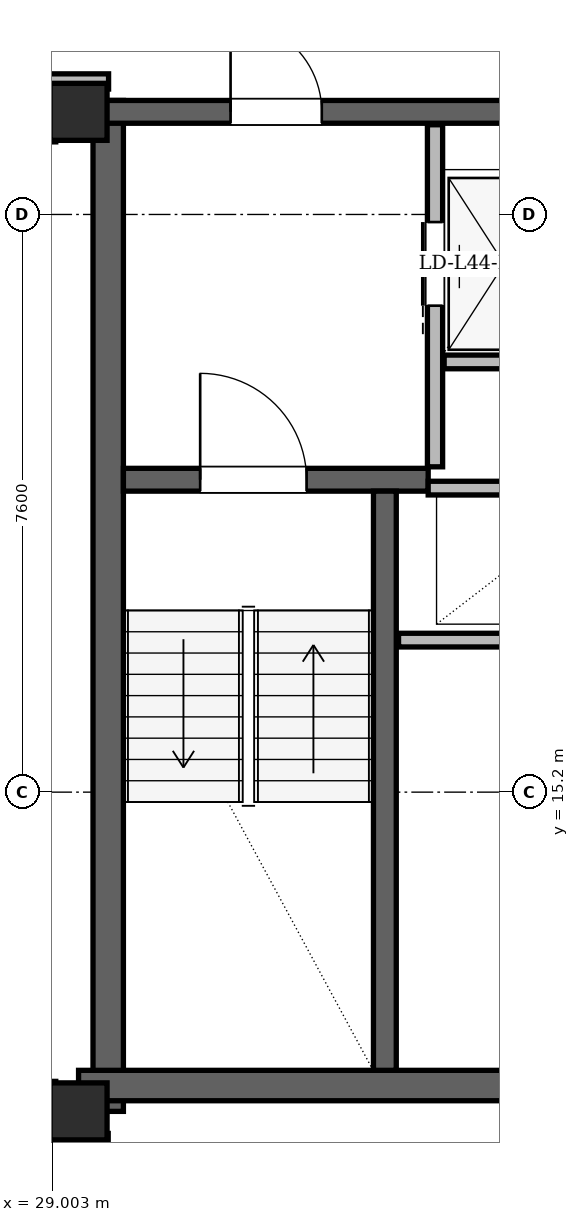
"""IFC4 building model, lengths in metres.
Left out: names, types, materials, properties, quantities, classifications, styles, units other than length and angle.
Written with IfcOpenShell. Run it as: python <this file> out.ifc"""

import sys

from ifc_helpers import new_model, si_unit, direction, frame, frame_2d, origin, origin_2d, place, context, subcontext, project, spatial, rectangle, hollow_rectangle, extrude, element, fill, save


model = new_model("IFC4")
c1 = context("Model", 3, precision=1e-05, world=origin(), true_north=direction((0.0, 1.0)))
c2 = subcontext(c1, "Body", "Model", "MODEL_VIEW")
j1 = project(units=[si_unit("LENGTHUNIT", "METRE"), si_unit("PLANEANGLEUNIT", "RADIAN")], contexts=[c1])
p1 = place(None, origin())
s1 = spatial("IfcSite", under=j1, at=p1, CompositionType="ELEMENT")
p2 = place(p1, origin())
s2 = spatial("IfcBuilding", under=s1, at=p2, CompositionType="ELEMENT")
p3 = place(p2, frame((0.0, 0.0, 167.4)))
s3 = spatial("IfcBuildingStorey", under=s2, at=p3, CompositionType="ELEMENT", Elevation=167.4)
for number, where, z_axis, x_axis in (
    (1, (29.35, 11.0, 0.0), (0.0, 0.0, 1.0), (1.0, 0.0, 0.0)),
    (2, (29.35, 24.15, 0.0), (0.0, 0.0, 1.0), (1.0, 0.0, 0.0)),
):
    element("IfcColumn", number, at=place(p3, frame(where, z_axis=z_axis, x_axis=x_axis)), inside=s3, PredefinedType="COLUMN", context=c2, shape_type="SweptSolid", body=[
        extrude(hollow_rectangle(XDim=0.75, YDim=0.75, WallThickness=0.06, at=origin_2d()), origin(), (0.0, 0.0, 1.0), 3.6),
    ])
p4 = place(p3, frame((29.74, 11.0, 0.0), z_axis=(0.0, 0.0, 1.0), x_axis=(0.0, 1.0, 0.0)))
e3 = element("IfcWall", 3, at=p4, inside=s3, PredefinedType="SHEAR", context=c2, shape_type="SweptSolid", body=[
    extrude(rectangle(XDim=13.3, YDim=0.4, at=frame_2d((6.65, 0.0))), origin(), (0.0, 0.0, 1.0), 3.38),
])
p5 = place(p3, frame((29.35, 11.34, 0.0), z_axis=(0.0, 0.0, 1.0), x_axis=(1.0, 0.0, 0.0)))
e4 = element("IfcWall", 4, at=p5, inside=s3, PredefinedType="SHEAR", context=c2, shape_type="SweptSolid", body=[
    extrude(rectangle(XDim=7.1, YDim=0.4, at=frame_2d((3.55, 0.0))), origin(), (0.0, 0.0, 1.0), 3.38),
])
p6 = place(p3, frame((29.65, 24.15, 0.0), z_axis=(0.0, 0.0, 1.0), x_axis=(1.0, 0.0, 0.0)))
e5 = element("IfcWall", 5, at=p6, inside=s3, PredefinedType="SHEAR", context=c2, shape_type="SweptSolid", body=[
    extrude(rectangle(XDim=15.7, YDim=0.3, at=frame_2d((7.85, 0.0))), origin(), (0.0, 0.0, 1.0), 3.38),
])
p7 = place(p6, frame((1.7, 0.0, 0.0)))
e6 = element("IfcOpeningElement", 6, at=p7, cuts=e5, PredefinedType="OPENING", context=c2, shape_type="SweptSolid", body=[
    extrude(rectangle(XDim=1.2, YDim=2.2, at=frame_2d((0.6, 1.1))), frame((0.0, 0.15, 0.0), z_axis=(0.0, -1.0, 0.0), x_axis=(1.0, 0.0, 0.0)), (0.0, 0.0, 1.0), 0.3),
])
p8 = place(p6, frame((12.8, 0.0, 0.0)))
e7 = element("IfcOpeningElement", 7, at=p8, cuts=e5, PredefinedType="OPENING", context=c2, shape_type="SweptSolid", body=[
    extrude(rectangle(XDim=1.2, YDim=2.2, at=frame_2d((0.6, 1.1))), frame((0.0, 0.15, 0.0), z_axis=(0.0, -1.0, 0.0), x_axis=(1.0, 0.0, 0.0)), (0.0, 0.0, 1.0), 0.3),
])
p9 = place(p6, frame((6.55, 0.0, 0.0)))
e8 = element("IfcOpeningElement", 8, at=p9, cuts=e5, PredefinedType="OPENING", context=c2, shape_type="SweptSolid", body=[
    extrude(rectangle(XDim=0.9, YDim=2.05, at=frame_2d((0.45, 1.025))), frame((0.0, 0.15, 0.0), z_axis=(0.0, -1.0, 0.0), x_axis=(1.0, 0.0, 0.0)), (0.0, 0.0, 1.0), 0.3),
])
p10 = place(p6, frame((8.45, 0.0, 0.0)))
e9 = element("IfcOpeningElement", 9, at=p10, cuts=e5, PredefinedType="OPENING", context=c2, shape_type="SweptSolid", body=[
    extrude(rectangle(XDim=0.9, YDim=2.05, at=frame_2d((0.45, 1.025))), frame((0.0, 0.15, 0.0), z_axis=(0.0, -1.0, 0.0), x_axis=(1.0, 0.0, 0.0)), (0.0, 0.0, 1.0), 0.3),
])
p11 = place(p3, frame((29.94, 19.31, 0.0), z_axis=(0.0, 0.0, 1.0), x_axis=(1.0, 0.0, 0.0)))
e10 = element("IfcWall", 10, at=p11, inside=s3, PredefinedType="SHEAR", context=c2, shape_type="SweptSolid", body=[
    extrude(rectangle(XDim=4.01, YDim=0.3, at=frame_2d((2.005, 0.0))), origin(), (0.0, 0.0, 1.0), 3.38),
])
p12 = place(p11, frame((1.01, 0.0, 0.0)))
e11 = element("IfcOpeningElement", 11, at=p12, cuts=e10, PredefinedType="OPENING", context=c2, shape_type="SweptSolid", body=[
    extrude(rectangle(XDim=1.4, YDim=2.2, at=frame_2d((0.7, 1.1))), frame((0.0, 0.15, 0.0), z_axis=(0.0, -1.0, 0.0), x_axis=(1.0, 0.0, 0.0)), (0.0, 0.0, 1.0), 0.3),
])
p13 = place(p3, frame((33.38, 11.54, 0.0), z_axis=(0.0, 0.0, 1.0), x_axis=(0.0, 1.0, 0.0)))
e12 = element("IfcWall", 12, at=p13, inside=s3, PredefinedType="SHEAR", context=c2, shape_type="SweptSolid", body=[
    extrude(rectangle(XDim=7.62, YDim=0.3, at=frame_2d((3.81, 0.0))), origin(), (0.0, 0.0, 1.0), 3.38),
])
p14 = place(p3, frame((33.146, 43.285, 0.0), z_axis=(0.0, 0.0, 1.0), x_axis=(-0.499997523705, -0.86602683347, 0.0)))
e13 = element("IfcWall", 13, at=p14, inside=s3, PredefinedType="SOLIDWALL", context=c2, shape_type="SweptSolid", body=[
    extrude(rectangle(XDim=35.802, YDim=0.29, at=frame_2d((17.901, 0.0))), origin(), (0.0, 0.0, 1.0), 2.6),
])
p15 = place(p14, frame((6.76, 0.0, 0.0)))
e14 = element("IfcOpeningElement", 14, at=p15, cuts=e13, PredefinedType="OPENING", context=c2, shape_type="SweptSolid", body=[
    extrude(rectangle(XDim=1.0, YDim=2.18, at=frame_2d((0.5, 1.09))), frame((0.0, 0.145, 0.0), z_axis=(0.0, -1.0, 0.0), x_axis=(1.0, 0.0, 0.0)), (0.0, 0.0, 1.0), 0.29),
])
p16 = place(p14, frame((26.688, 0.0, 0.0)))
e15 = element("IfcOpeningElement", 15, at=p16, cuts=e13, PredefinedType="OPENING", context=c2, shape_type="SweptSolid", body=[
    extrude(rectangle(XDim=1.5, YDim=2.2, at=frame_2d((0.75, 1.1))), frame((0.0, 0.145, 0.0), z_axis=(0.0, -1.0, 0.0), x_axis=(1.0, 0.0, 0.0)), (0.0, 0.0, 1.0), 0.29),
])
p17 = place(p14, frame((33.698, 0.0, 0.85)))
e16 = element("IfcOpeningElement", 16, at=p17, cuts=e13, PredefinedType="OPENING", context=c2, shape_type="SweptSolid", body=[
    extrude(rectangle(XDim=1.2, YDim=1.48, at=frame_2d((0.6, 0.74))), frame((0.0, 0.145, 0.0), z_axis=(0.0, -1.0, 0.0), x_axis=(1.0, 0.0, 0.0)), (0.0, 0.0, 1.0), 0.29),
])
p18 = place(p14, frame((22.123, 0.0, 0.85)))
e17 = element("IfcOpeningElement", 17, at=p18, cuts=e13, PredefinedType="OPENING", context=c2, shape_type="SweptSolid", body=[
    extrude(rectangle(XDim=1.2, YDim=1.48, at=frame_2d((0.6, 0.74))), frame((0.0, 0.145, 0.0), z_axis=(0.0, -1.0, 0.0), x_axis=(1.0, 0.0, 0.0)), (0.0, 0.0, 1.0), 0.29),
])
p19 = place(p14, frame((12.284, 0.0, 0.85)))
e18 = element("IfcOpeningElement", 18, at=p19, cuts=e13, PredefinedType="OPENING", context=c2, shape_type="SweptSolid", body=[
    extrude(rectangle(XDim=1.6, YDim=1.64, at=frame_2d((0.8, 0.82))), frame((0.0, 0.145, 0.0), z_axis=(0.0, -1.0, 0.0), x_axis=(1.0, 0.0, 0.0)), (0.0, 0.0, 1.0), 0.29),
])
p20 = place(p14, frame((17.539, 0.0, 0.85)))
e19 = element("IfcOpeningElement", 19, at=p20, cuts=e13, PredefinedType="OPENING", context=c2, shape_type="SweptSolid", body=[
    extrude(rectangle(XDim=3.0, YDim=1.64, at=frame_2d((1.5, 0.82))), frame((0.0, 0.145, 0.0), z_axis=(0.0, -1.0, 0.0), x_axis=(1.0, 0.0, 0.0)), (0.0, 0.0, 1.0), 0.29),
])
p21 = place(p14, frame((1.23, 0.0, 0.85)))
e20 = element("IfcOpeningElement", 20, at=p21, cuts=e13, PredefinedType="OPENING", context=c2, shape_type="SweptSolid", body=[
    extrude(rectangle(XDim=1.2, YDim=1.48, at=frame_2d((0.6, 0.74))), frame((0.0, 0.145, 0.0), z_axis=(0.0, -1.0, 0.0), x_axis=(1.0, 0.0, 0.0)), (0.0, 0.0, 1.0), 0.29),
])
p22 = place(p14, frame((30.487, 0.0, 0.85)))
e21 = element("IfcOpeningElement", 21, at=p22, cuts=e13, PredefinedType="OPENING", context=c2, shape_type="SweptSolid", body=[
    extrude(rectangle(XDim=1.2, YDim=1.48, at=frame_2d((0.6, 0.74))), frame((0.0, 0.145, 0.0), z_axis=(0.0, -1.0, 0.0), x_axis=(1.0, 0.0, 0.0)), (0.0, 0.0, 1.0), 0.29),
])
p23 = place(p3, frame((34.04, 19.48, 0.0), z_axis=(0.0, 0.0, 1.0), x_axis=(0.0, 1.0, 0.0)))
e22 = element("IfcWall", 22, at=p23, inside=s3, PredefinedType="PARTITIONING", context=c2, shape_type="SweptSolid", body=[
    extrude(rectangle(XDim=4.5, YDim=0.2, at=frame_2d((2.25, 0.0))), origin(), (0.0, 0.0, 1.0), 3.38),
])
p24 = place(p23, frame((2.12, 0.0, 0.0)))
e23 = element("IfcOpeningElement", 23, at=p24, cuts=e22, PredefinedType="OPENING", context=c2, shape_type="SweptSolid", body=[
    extrude(rectangle(XDim=1.1, YDim=2.2, at=frame_2d((0.55, 1.1))), frame((0.0, 0.1, 0.0), z_axis=(0.0, -1.0, 0.0), x_axis=(1.0, 0.0, 0.0)), (0.0, 0.0, 1.0), 0.2),
])
p25 = place(p3, frame((34.16, 20.86, 0.0), z_axis=(0.0, 0.0, 1.0), x_axis=(1.0, 0.0, 0.0)))
e24 = element("IfcWall", 24, at=p25, inside=s3, PredefinedType="PARTITIONING", context=c2, shape_type="SweptSolid", body=[
    extrude(rectangle(XDim=1.58, YDim=0.18, at=frame_2d((0.79, 0.0))), origin(), (0.0, 0.0, 1.0), 3.38),
])
p26 = place(p3, frame((33.95, 19.2, 0.0), z_axis=(0.0, 0.0, 1.0), x_axis=(1.0, 0.0, 0.0)))
e25 = element("IfcWall", 25, at=p26, inside=s3, PredefinedType="PARTITIONING", context=c2, shape_type="SweptSolid", body=[
    extrude(rectangle(XDim=2.27, YDim=0.18, at=frame_2d((1.135, 0.0))), origin(), (0.0, 0.0, 1.0), 3.38),
])
p27 = place(p3, frame((33.56, 17.2, 0.0), z_axis=(0.0, 0.0, 1.0), x_axis=(1.0, 0.0, 0.0)))
e26 = element("IfcWall", 26, at=p27, inside=s3, PredefinedType="PARTITIONING", context=c2, shape_type="SweptSolid", body=[
    extrude(rectangle(XDim=2.66, YDim=0.18, at=frame_2d((1.33, 0.0))), origin(), (0.0, 0.0, 1.0), 3.38),
])
p28 = place(p3, frame((28.96, 10.61, 0.0), z_axis=(0.0, 0.0, 1.0), x_axis=(1.0, 0.0, 0.0)))
e27 = element("IfcWall", 27, at=p28, inside=s3, PredefinedType="PARTITIONING", context=c2, shape_type="SweptSolid", body=[
    extrude(rectangle(XDim=0.78, YDim=0.2, at=frame_2d((0.39, 0.0))), origin(), (0.0, 0.0, 1.0), 3.38),
])
p29 = place(p3, frame((28.955, 24.55, 0.0), z_axis=(0.0, 0.0, 1.0), x_axis=(1.0, 0.0, 0.0)))
e28 = element("IfcWall", 28, at=p29, inside=s3, PredefinedType="PARTITIONING", context=c2, shape_type="SweptSolid", body=[
    extrude(rectangle(XDim=0.79, YDim=0.2, at=frame_2d((0.395, 0.0))), origin(), (0.0, 0.0, 1.0), 2.842),
])
p30 = place(p3, frame((28.95, 10.95, 0.0), z_axis=(0.0, 0.0, 1.0), x_axis=(0.0, 1.0, 0.0)))
e29 = element("IfcWall", 29, at=p30, inside=s3, PredefinedType="PARTITIONING", context=c2, shape_type="SweptSolid", body=[
    extrude(rectangle(XDim=0.445, YDim=0.2, at=frame_2d((0.223, 0.0))), origin(), (0.0, 0.0, 1.0), 2.842),
])
p31 = place(p3, frame((28.95, 23.755, 0.0), z_axis=(0.0, 0.0, 1.0), x_axis=(0.0, 1.0, 0.0)))
e30 = element("IfcWall", 30, at=p31, inside=s3, PredefinedType="PARTITIONING", context=c2, shape_type="SweptSolid", body=[
    extrude(rectangle(XDim=0.565, YDim=0.2, at=frame_2d((0.283, 0.0))), origin(), (0.0, 0.0, 1.0), 3.38),
])
p32 = place(p24, origin())
e31 = element("IfcDoor", 31, at=p32, inside=s3, OperationType="SLIDING_TO_LEFT", PredefinedType="DOOR", context=c2, shape_type="SweptSolid", body=[
    extrude(rectangle(XDim=1.1, YDim=2.2, at=frame_2d((0.55, 1.1))), frame((0.0, 0.025, 0.0), z_axis=(0.0, -1.0, 0.0), x_axis=(1.0, 0.0, 0.0)), (0.0, 0.0, 1.0), 0.05),
])
fill(e23, e31)
p33 = place(p12, origin())
e32 = element("IfcDoor", 32, at=p33, inside=s3, OperationType="SINGLE_SWING_LEFT", PredefinedType="DOOR", context=c2, shape_type="SweptSolid", body=[
    extrude(rectangle(XDim=1.4, YDim=2.2, at=frame_2d((0.7, 1.1))), frame((0.0, 0.025, 0.0), z_axis=(0.0, -1.0, 0.0), x_axis=(1.0, 0.0, 0.0)), (0.0, 0.0, 1.0), 0.05),
])
fill(e11, e32)
p34 = place(p7, origin())
e33 = element("IfcDoor", 33, at=p34, inside=s3, OperationType="SINGLE_SWING_LEFT", PredefinedType="DOOR", context=c2, shape_type="SweptSolid", body=[
    extrude(rectangle(XDim=1.2, YDim=2.2, at=frame_2d((0.6, 1.1))), frame((0.0, 0.025, 0.0), z_axis=(0.0, -1.0, 0.0), x_axis=(1.0, 0.0, 0.0)), (0.0, 0.0, 1.0), 0.05),
])
fill(e6, e33)
save(model, sys.argv[1])
